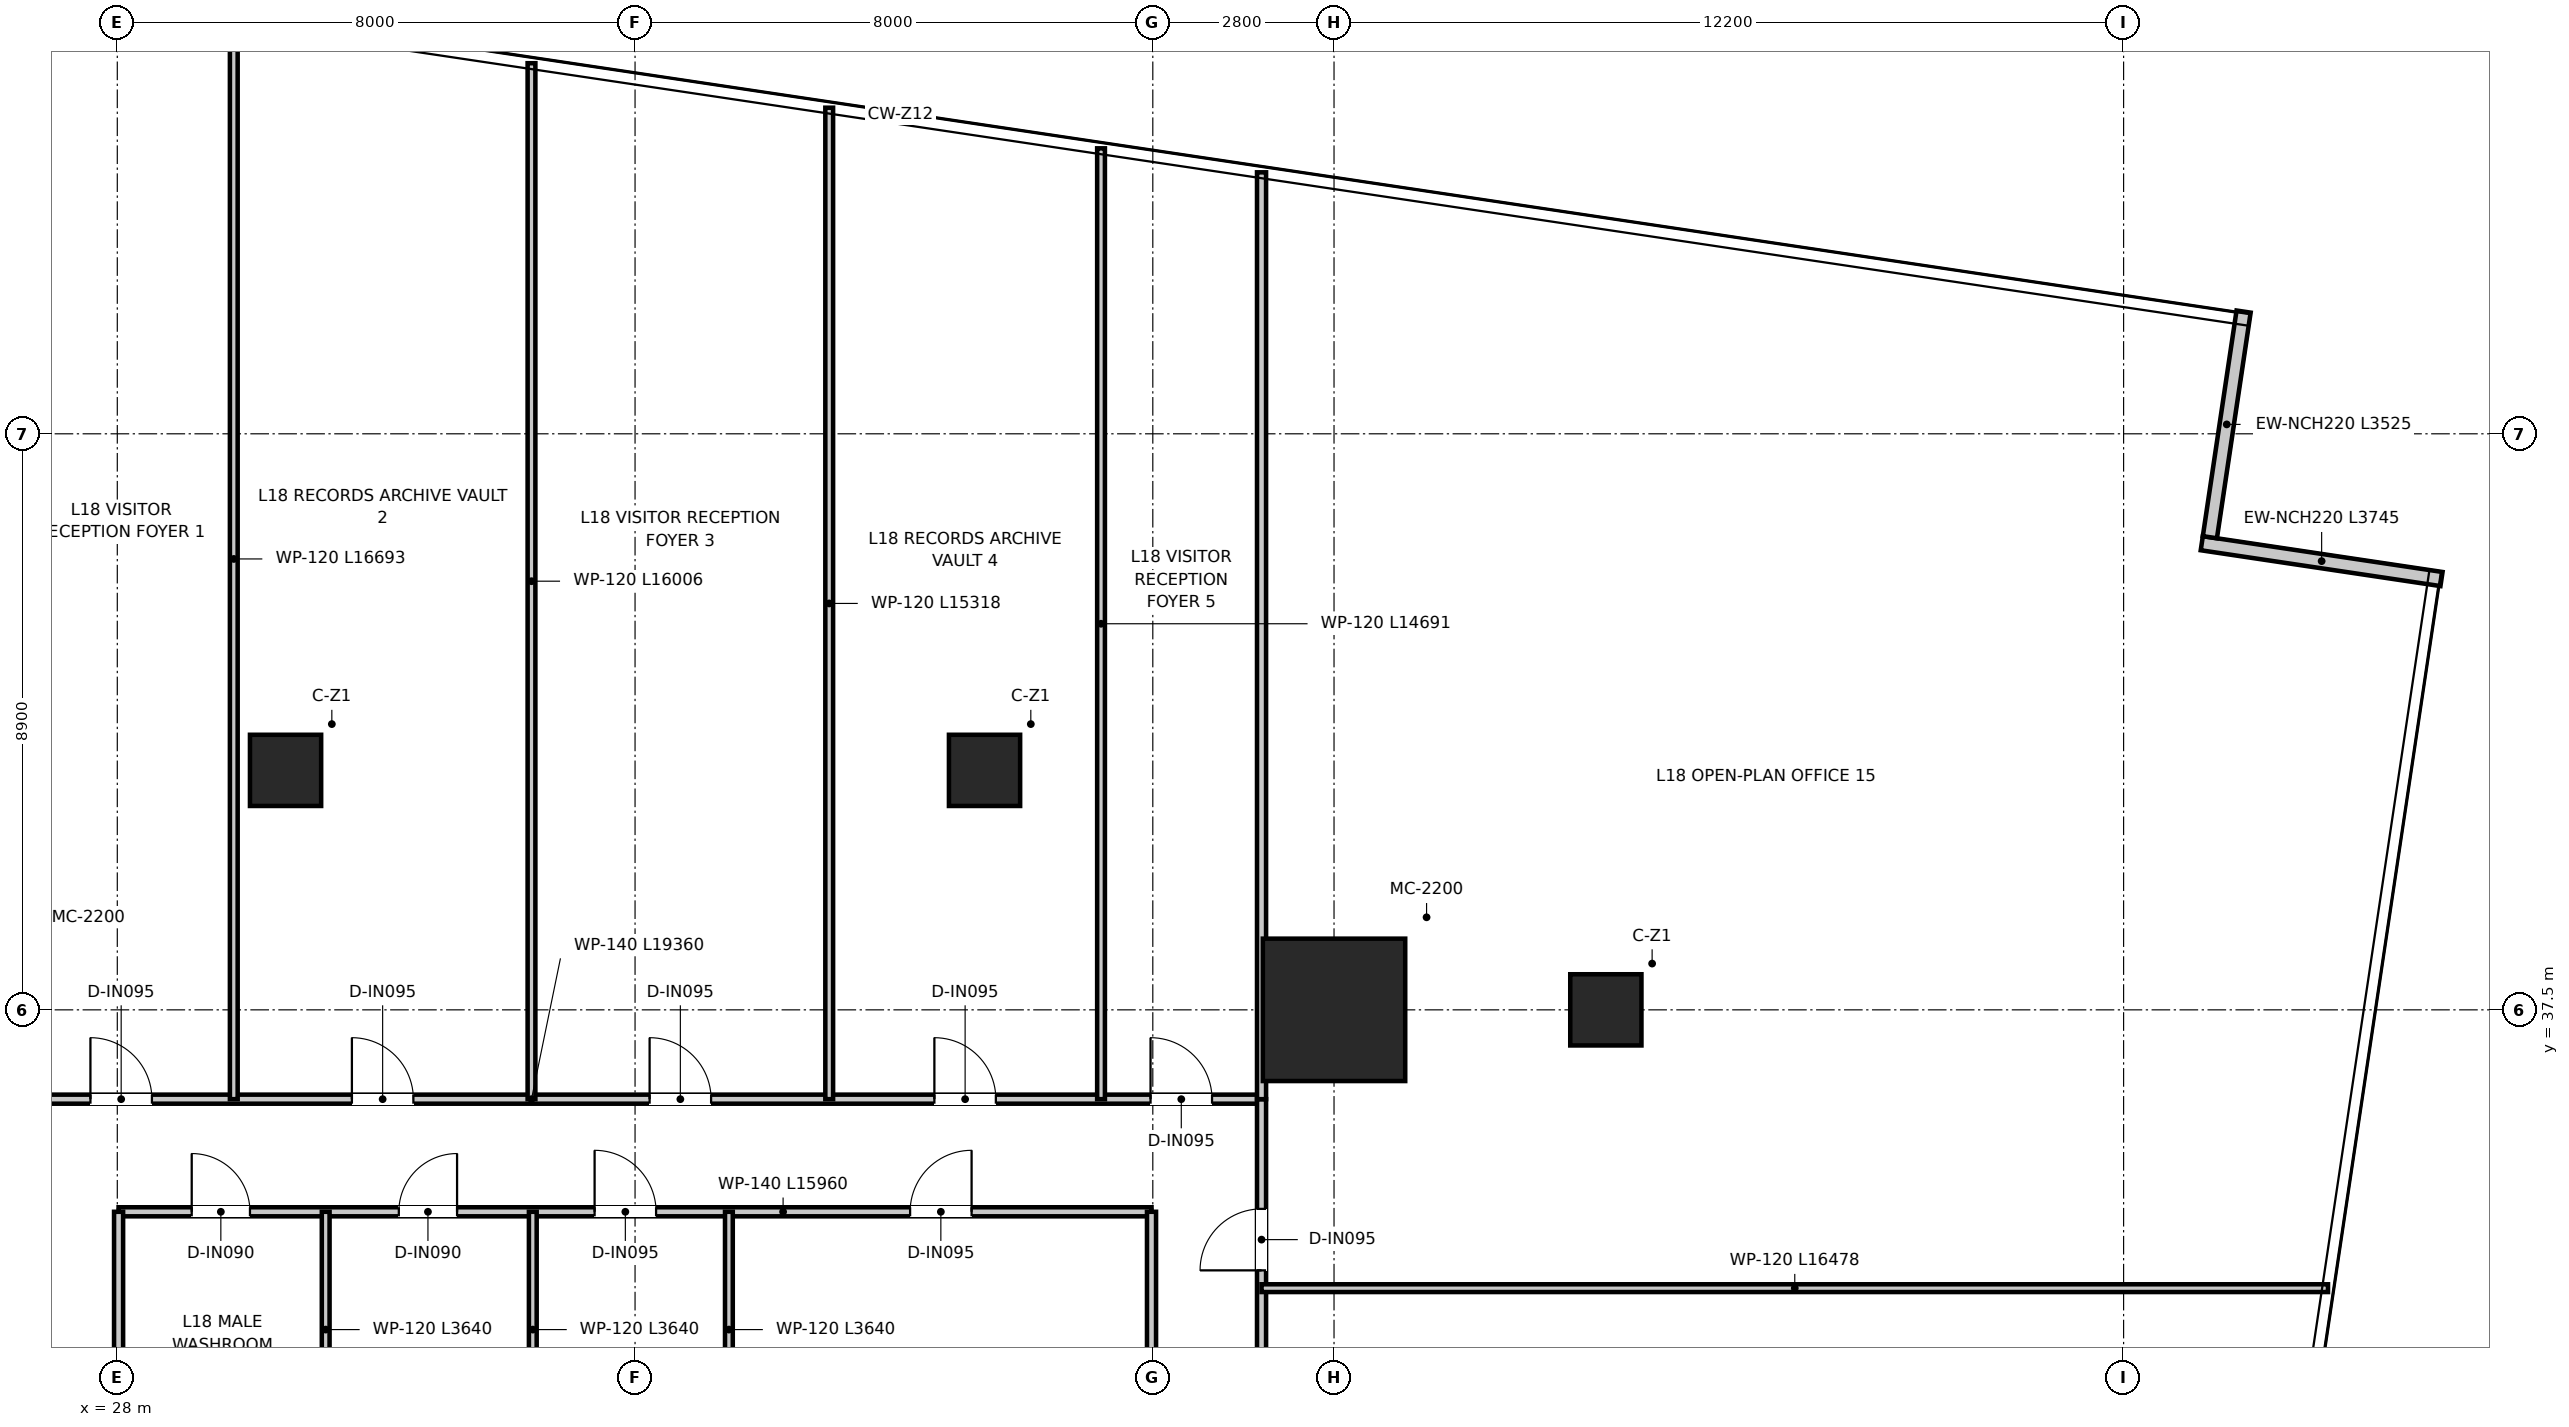
"""IFC4 building model, lengths in metres.
Left out: names, types, materials, properties, quantities, classifications, styles, units other than length and angle.
Written with IfcOpenShell. Run it as: python <this file> out.ifc"""

import sys

from ifc_helpers import new_model, si_unit, direction, frame, frame_2d, origin, origin_2d, place, context, subcontext, project, spatial, rectangle, extrude, source, transform, mapped, element, fill, save


model = new_model("IFC4")
c1 = context("Model", 3, precision=1e-05, world=origin(), true_north=direction((0.0, 1.0)))
c2 = subcontext(c1, "Body", "Model", "MODEL_VIEW")
j1 = project(units=[si_unit("LENGTHUNIT", "METRE"), si_unit("PLANEANGLEUNIT", "RADIAN")], contexts=[c1])
p1 = place(None, origin())
s1 = spatial("IfcSite", under=j1, at=p1, CompositionType="ELEMENT")
p2 = place(p1, origin())
s2 = spatial("IfcBuilding", under=s1, at=p2, CompositionType="ELEMENT")
p3 = place(p2, frame((0.0, 0.0, 76.35)))
s3 = spatial("IfcBuildingStorey", under=s2, at=p3, CompositionType="ELEMENT", Elevation=76.35)
m1 = source(origin(), c2, "Body", "SweptSolid", [
    extrude(rectangle(XDim=2.2, YDim=2.2, at=origin_2d()), origin(), (0.0, 0.0, 1.0), 3.95),
])
p4 = place(p3, frame((46.8, 37.5, 0.0), z_axis=(0.0, 0.0, 1.0), x_axis=(1.0, 0.0, 0.0)))
e1 = element("IfcColumn", 1, at=p4, inside=s3, PredefinedType="USERDEFINED", context=c2, shape_type="MappedRepresentation", body=[
    mapped(m1, transform((0.0, 0.0, 0.0), x_axis=(1.0, 0.0, 0.0), y_axis=(0.0, 1.0, 0.0), z_axis=(0.0, 0.0, 1.0), scale=1.0)),
])
m2 = source(origin(), c2, "Body", "SweptSolid", [
    extrude(rectangle(XDim=1.1, YDim=1.1, at=origin_2d()), origin(), (0.0, 0.0, 1.0), 3.95),
])
for number, where, z_axis, x_axis in (
    (2, (30.6, 41.2, 0.0), (0.0, 0.0, 1.0), (1.0, 0.0, 0.0)),
    (3, (41.4, 41.2, 0.0), (0.0, 0.0, 1.0), (1.0, 0.0, 0.0)),
    (4, (51.0, 37.5, 0.0), (0.0, 0.0, 1.0), (1.0, 0.0, 0.0)),
):
    element("IfcColumn", number, at=place(p3, frame(where, z_axis=z_axis, x_axis=x_axis)), inside=s3, PredefinedType="COLUMN", context=c2, shape_type="MappedRepresentation", body=[
        mapped(m2, transform((0.0, 0.0, 0.0), x_axis=(1.0, 0.0, 0.0), y_axis=(0.0, 1.0, 0.0), z_axis=(0.0, 0.0, 1.0), scale=1.0)),
    ])
p5 = place(p3, frame((63.912, 44.156, 0.0), z_axis=(0.0, 0.0, 1.0), x_axis=(-0.989009392913, 0.147852699435, 0.0)))
e5 = element("IfcWall", 5, at=p5, inside=s3, PredefinedType="ELEMENTEDWALL", context=c2, shape_type="SweptSolid", body=[
    extrude(rectangle(XDim=3.745, YDim=0.22, at=frame_2d((1.873, 0.0))), origin(), (0.0, 0.0, 1.0), 3.59),
])
p6 = place(p3, frame((60.333, 44.802, 0.0), z_axis=(0.0, 0.0, 1.0), x_axis=(0.147798551521, 0.98901748628, 0.0)))
e6 = element("IfcWall", 6, at=p6, inside=s3, PredefinedType="ELEMENTEDWALL", context=c2, shape_type="SweptSolid", body=[
    extrude(rectangle(XDim=3.525, YDim=0.22, at=frame_2d((1.763, 0.0))), origin(), (0.0, 0.0, 1.0), 3.59),
])
p7 = place(p3, frame((28.02, 34.38, 0.0), z_axis=(0.0, 0.0, 1.0), x_axis=(1.0, 0.0, 0.0)))
e7 = element("IfcWall", 7, at=p7, inside=s3, PredefinedType="PARTITIONING", context=c2, shape_type="SweptSolid", body=[
    extrude(rectangle(XDim=15.96, YDim=0.14, at=frame_2d((7.98, 0.0))), origin(), (0.0, 0.0, 1.0), 3.0),
])
p8 = place(p7, frame((1.13, 0.0, 0.0)))
e8 = element("IfcOpeningElement", 8, at=p8, cuts=e7, PredefinedType="OPENING", context=c2, shape_type="SweptSolid", body=[
    extrude(rectangle(XDim=0.9, YDim=2.1, at=frame_2d((0.45, 1.05))), frame((0.0, 0.08, 0.0), z_axis=(0.0, -1.0, 0.0), x_axis=(1.0, 0.0, 0.0)), (0.0, 0.0, 1.0), 0.16),
])
p9 = place(p7, frame((4.33, 0.0, 0.0)))
e9 = element("IfcOpeningElement", 9, at=p9, cuts=e7, PredefinedType="OPENING", context=c2, shape_type="SweptSolid", body=[
    extrude(rectangle(XDim=0.9, YDim=2.1, at=frame_2d((0.45, 1.05))), frame((0.0, 0.08, 0.0), z_axis=(0.0, -1.0, 0.0), x_axis=(1.0, 0.0, 0.0)), (0.0, 0.0, 1.0), 0.16),
])
p10 = place(p7, frame((7.355, 0.0, 0.0)))
e10 = element("IfcOpeningElement", 10, at=p10, cuts=e7, PredefinedType="OPENING", context=c2, shape_type="SweptSolid", body=[
    extrude(rectangle(XDim=0.95, YDim=2.1, at=frame_2d((0.475, 1.05))), frame((0.0, 0.08, 0.0), z_axis=(0.0, -1.0, 0.0), x_axis=(1.0, 0.0, 0.0)), (0.0, 0.0, 1.0), 0.16),
])
p11 = place(p7, frame((12.23, 0.0, 0.0)))
e11 = element("IfcOpeningElement", 11, at=p11, cuts=e7, PredefinedType="OPENING", context=c2, shape_type="SweptSolid", body=[
    extrude(rectangle(XDim=0.95, YDim=2.1, at=frame_2d((0.475, 1.05))), frame((0.0, 0.08, 0.0), z_axis=(0.0, -1.0, 0.0), x_axis=(1.0, 0.0, 0.0)), (0.0, 0.0, 1.0), 0.16),
])
for number, where, z_axis, x_axis in (
    (12, (28.02, 28.64, 0.0), (0.0, 0.0, 1.0), (0.0, 1.0, 0.0)),
    (13, (43.98, 28.64, 0.0), (0.0, 0.0, 1.0), (0.0, 1.0, 0.0)),
):
    element("IfcWall", number, at=place(p3, frame(where, z_axis=z_axis, x_axis=x_axis)), inside=s3, PredefinedType="PARTITIONING", context=c2, shape_type="SweptSolid", body=[
        extrude(rectangle(XDim=5.74, YDim=0.14, at=frame_2d((2.87, 0.0))), origin(), (0.0, 0.0, 1.0), 3.14),
    ])
for number, where, z_axis, x_axis in (
    (14, (31.22, 30.74, 0.0), (0.0, 0.0, 1.0), (0.0, 1.0, 0.0)),
    (15, (34.42, 30.74, 0.0), (0.0, 0.0, 1.0), (0.0, 1.0, 0.0)),
    (16, (37.45, 30.74, 0.0), (0.0, 0.0, 1.0), (0.0, 1.0, 0.0)),
):
    element("IfcWall", number, at=place(p3, frame(where, z_axis=z_axis, x_axis=x_axis)), inside=s3, PredefinedType="PARTITIONING", context=c2, shape_type="SweptSolid", body=[
        extrude(rectangle(XDim=3.64, YDim=0.12, at=frame_2d((1.82, 0.0))), origin(), (0.0, 0.0, 1.0), 3.04),
    ])
p12 = place(p3, frame((26.32, 36.12, 0.0), z_axis=(0.0, 0.0, 1.0), x_axis=(1.0, 0.0, 0.0)))
e17 = element("IfcWall", 17, at=p12, inside=s3, PredefinedType="PARTITIONING", context=c2, shape_type="SweptSolid", body=[
    extrude(rectangle(XDim=19.36, YDim=0.14, at=frame_2d((9.68, 0.0))), origin(), (0.0, 0.0, 1.0), 3.0),
])
p13 = place(p12, frame((1.265, 0.0, 0.0)))
e18 = element("IfcOpeningElement", 18, at=p13, cuts=e17, PredefinedType="OPENING", context=c2, shape_type="SweptSolid", body=[
    extrude(rectangle(XDim=0.95, YDim=2.1, at=frame_2d((0.475, 1.05))), frame((0.0, 0.08, 0.0), z_axis=(0.0, -1.0, 0.0), x_axis=(1.0, 0.0, 0.0)), (0.0, 0.0, 1.0), 0.16),
])
p14 = place(p12, frame((5.305, 0.0, 0.0)))
e19 = element("IfcOpeningElement", 19, at=p14, cuts=e17, PredefinedType="OPENING", context=c2, shape_type="SweptSolid", body=[
    extrude(rectangle(XDim=0.95, YDim=2.1, at=frame_2d((0.475, 1.05))), frame((0.0, 0.08, 0.0), z_axis=(0.0, -1.0, 0.0), x_axis=(1.0, 0.0, 0.0)), (0.0, 0.0, 1.0), 0.16),
])
p15 = place(p12, frame((9.905, 0.0, 0.0)))
e20 = element("IfcOpeningElement", 20, at=p15, cuts=e17, PredefinedType="OPENING", context=c2, shape_type="SweptSolid", body=[
    extrude(rectangle(XDim=0.95, YDim=2.1, at=frame_2d((0.475, 1.05))), frame((0.0, 0.08, 0.0), z_axis=(0.0, -1.0, 0.0), x_axis=(1.0, 0.0, 0.0)), (0.0, 0.0, 1.0), 0.16),
])
p16 = place(p12, frame((14.305, 0.0, 0.0)))
e21 = element("IfcOpeningElement", 21, at=p16, cuts=e17, PredefinedType="OPENING", context=c2, shape_type="SweptSolid", body=[
    extrude(rectangle(XDim=0.95, YDim=2.1, at=frame_2d((0.475, 1.05))), frame((0.0, 0.08, 0.0), z_axis=(0.0, -1.0, 0.0), x_axis=(1.0, 0.0, 0.0)), (0.0, 0.0, 1.0), 0.16),
])
p17 = place(p12, frame((17.645, 0.0, 0.0)))
e22 = element("IfcOpeningElement", 22, at=p17, cuts=e17, PredefinedType="OPENING", context=c2, shape_type="SweptSolid", body=[
    extrude(rectangle(XDim=0.95, YDim=2.1, at=frame_2d((0.475, 1.05))), frame((0.0, 0.08, 0.0), z_axis=(0.0, -1.0, 0.0), x_axis=(1.0, 0.0, 0.0)), (0.0, 0.0, 1.0), 0.16),
])
p18 = place(p3, frame((45.68, 10.5, 0.0), z_axis=(0.0, 0.0, 1.0), x_axis=(0.0, 1.0, 0.0)))
e23 = element("IfcWall", 23, at=p18, inside=s3, PredefinedType="PARTITIONING", context=c2, shape_type="SweptSolid", body=[
    extrude(rectangle(XDim=25.62, YDim=0.14, at=frame_2d((12.81, 0.0))), origin(), (0.0, 0.0, 1.0), 2.89),
])
p19 = place(p18, frame((7.775, 0.0, 0.0)))
e24 = element("IfcOpeningElement", 24, at=p19, cuts=e23, PredefinedType="OPENING", context=c2, shape_type="SweptSolid", body=[
    extrude(rectangle(XDim=0.95, YDim=2.1, at=frame_2d((0.475, 1.05))), frame((0.0, 0.08, 0.0), z_axis=(0.0, -1.0, 0.0), x_axis=(1.0, 0.0, 0.0)), (0.0, 0.0, 1.0), 0.16),
])
p20 = place(p18, frame((11.275, 0.0, 0.0)))
e25 = element("IfcOpeningElement", 25, at=p20, cuts=e23, PredefinedType="OPENING", context=c2, shape_type="SweptSolid", body=[
    extrude(rectangle(XDim=0.95, YDim=2.1, at=frame_2d((0.475, 1.05))), frame((0.0, 0.08, 0.0), z_axis=(0.0, -1.0, 0.0), x_axis=(1.0, 0.0, 0.0)), (0.0, 0.0, 1.0), 0.16),
])
p21 = place(p18, frame((15.775, 0.0, 0.0)))
e26 = element("IfcOpeningElement", 26, at=p21, cuts=e23, PredefinedType="OPENING", context=c2, shape_type="SweptSolid", body=[
    extrude(rectangle(XDim=0.95, YDim=2.1, at=frame_2d((0.475, 1.05))), frame((0.0, 0.08, 0.0), z_axis=(0.0, -1.0, 0.0), x_axis=(1.0, 0.0, 0.0)), (0.0, 0.0, 1.0), 0.16),
])
p22 = place(p18, frame((20.125, 0.0, 0.0)))
e27 = element("IfcOpeningElement", 27, at=p22, cuts=e23, PredefinedType="OPENING", context=c2, shape_type="SweptSolid", body=[
    extrude(rectangle(XDim=0.95, YDim=2.1, at=frame_2d((0.475, 1.05))), frame((0.0, 0.08, 0.0), z_axis=(0.0, -1.0, 0.0), x_axis=(1.0, 0.0, 0.0)), (0.0, 0.0, 1.0), 0.16),
])
p23 = place(p18, frame((22.975, 0.0, 0.0)))
e28 = element("IfcOpeningElement", 28, at=p23, cuts=e23, PredefinedType="OPENING", context=c2, shape_type="SweptSolid", body=[
    extrude(rectangle(XDim=0.95, YDim=2.1, at=frame_2d((0.475, 1.05))), frame((0.0, 0.08, 0.0), z_axis=(0.0, -1.0, 0.0), x_axis=(1.0, 0.0, 0.0)), (0.0, 0.0, 1.0), 0.16),
])
p24 = place(p3, frame((45.68, 36.12, 0.0), z_axis=(0.0, 0.0, 1.0), x_axis=(0.0, 1.0, 0.0)))
e29 = element("IfcWall", 29, at=p24, inside=s3, PredefinedType="PARTITIONING", context=c2, shape_type="SweptSolid", body=[
    extrude(rectangle(XDim=14.32, YDim=0.14, at=frame_2d((7.16, 0.0))), origin(), (0.0, 0.0, 1.0), 2.89),
])
p25 = place(p3, frame((29.8, 36.12, 0.0), z_axis=(0.0, 0.0, 1.0), x_axis=(0.0, 1.0, 0.0)))
e30 = element("IfcWall", 30, at=p25, inside=s3, PredefinedType="PARTITIONING", context=c2, shape_type="SweptSolid", body=[
    extrude(rectangle(XDim=16.693, YDim=0.12, at=frame_2d((8.347, 0.0))), origin(), (0.0, 0.0, 1.0), 2.89),
])
p26 = place(p3, frame((34.4, 36.12, 0.0), z_axis=(0.0, 0.0, 1.0), x_axis=(0.0, 1.0, 0.0)))
e31 = element("IfcWall", 31, at=p26, inside=s3, PredefinedType="PARTITIONING", context=c2, shape_type="SweptSolid", body=[
    extrude(rectangle(XDim=16.006, YDim=0.12, at=frame_2d((8.003, 0.0))), origin(), (0.0, 0.0, 1.0), 2.89),
])
p27 = place(p3, frame((39.0, 36.12, 0.0), z_axis=(0.0, 0.0, 1.0), x_axis=(0.0, 1.0, 0.0)))
e32 = element("IfcWall", 32, at=p27, inside=s3, PredefinedType="PARTITIONING", context=c2, shape_type="SweptSolid", body=[
    extrude(rectangle(XDim=15.318, YDim=0.12, at=frame_2d((7.659, 0.0))), origin(), (0.0, 0.0, 1.0), 2.89),
])
p28 = place(p3, frame((43.2, 36.12, 0.0), z_axis=(0.0, 0.0, 1.0), x_axis=(0.0, 1.0, 0.0)))
e33 = element("IfcWall", 33, at=p28, inside=s3, PredefinedType="PARTITIONING", context=c2, shape_type="SweptSolid", body=[
    extrude(rectangle(XDim=14.69, YDim=0.12, at=frame_2d((7.345, 0.0))), origin(), (0.0, 0.0, 1.0), 2.89),
])
p29 = place(p3, frame((45.68, 33.2, 0.0), z_axis=(0.0, 0.0, 1.0), x_axis=(1.0, 0.0, 0.0)))
e34 = element("IfcWall", 34, at=p29, inside=s3, PredefinedType="PARTITIONING", context=c2, shape_type="SweptSolid", body=[
    extrude(rectangle(XDim=16.478, YDim=0.12, at=frame_2d((8.239, 0.0))), origin(), (0.0, 0.0, 1.0), 2.89),
])
p30 = place(p8, origin())
e35 = element("IfcDoor", 35, at=p30, inside=s3, OperationType="SINGLE_SWING_LEFT", PredefinedType="DOOR", context=c2, shape_type="SweptSolid", body=[
    extrude(rectangle(XDim=0.9, YDim=2.1, at=frame_2d((0.45, 1.05))), frame((0.0, 0.025, 0.0), z_axis=(0.0, -1.0, 0.0), x_axis=(1.0, 0.0, 0.0)), (0.0, 0.0, 1.0), 0.05),
])
fill(e8, e35)
p31 = place(p9, origin())
e36 = element("IfcDoor", 36, at=p31, inside=s3, OperationType="SINGLE_SWING_RIGHT", PredefinedType="DOOR", context=c2, shape_type="SweptSolid", body=[
    extrude(rectangle(XDim=0.9, YDim=2.1, at=frame_2d((0.45, 1.05))), frame((0.0, 0.025, 0.0), z_axis=(0.0, -1.0, 0.0), x_axis=(1.0, 0.0, 0.0)), (0.0, 0.0, 1.0), 0.05),
])
fill(e9, e36)
p32 = place(p10, origin())
e37 = element("IfcDoor", 37, at=p32, inside=s3, OperationType="SINGLE_SWING_LEFT", PredefinedType="DOOR", context=c2, shape_type="SweptSolid", body=[
    extrude(rectangle(XDim=0.95, YDim=2.1, at=frame_2d((0.475, 1.05))), frame((0.0, 0.025, 0.0), z_axis=(0.0, -1.0, 0.0), x_axis=(1.0, 0.0, 0.0)), (0.0, 0.0, 1.0), 0.05),
])
fill(e10, e37)
p33 = place(p11, origin())
e38 = element("IfcDoor", 38, at=p33, inside=s3, OperationType="SINGLE_SWING_RIGHT", PredefinedType="DOOR", context=c2, shape_type="SweptSolid", body=[
    extrude(rectangle(XDim=0.95, YDim=2.1, at=frame_2d((0.475, 1.05))), frame((0.0, 0.025, 0.0), z_axis=(0.0, -1.0, 0.0), x_axis=(1.0, 0.0, 0.0)), (0.0, 0.0, 1.0), 0.05),
])
fill(e11, e38)
p34 = place(p13, origin())
e39 = element("IfcDoor", 39, at=p34, inside=s3, OperationType="SINGLE_SWING_LEFT", PredefinedType="DOOR", context=c2, shape_type="SweptSolid", body=[
    extrude(rectangle(XDim=0.95, YDim=2.1, at=frame_2d((0.475, 1.05))), frame((0.0, 0.025, 0.0), z_axis=(0.0, -1.0, 0.0), x_axis=(1.0, 0.0, 0.0)), (0.0, 0.0, 1.0), 0.05),
])
fill(e18, e39)
p35 = place(p14, origin())
e40 = element("IfcDoor", 40, at=p35, inside=s3, OperationType="SINGLE_SWING_LEFT", PredefinedType="DOOR", context=c2, shape_type="SweptSolid", body=[
    extrude(rectangle(XDim=0.95, YDim=2.1, at=frame_2d((0.475, 1.05))), frame((0.0, 0.025, 0.0), z_axis=(0.0, -1.0, 0.0), x_axis=(1.0, 0.0, 0.0)), (0.0, 0.0, 1.0), 0.05),
])
fill(e19, e40)
p36 = place(p15, origin())
e41 = element("IfcDoor", 41, at=p36, inside=s3, OperationType="SINGLE_SWING_LEFT", PredefinedType="DOOR", context=c2, shape_type="SweptSolid", body=[
    extrude(rectangle(XDim=0.95, YDim=2.1, at=frame_2d((0.475, 1.05))), frame((0.0, 0.025, 0.0), z_axis=(0.0, -1.0, 0.0), x_axis=(1.0, 0.0, 0.0)), (0.0, 0.0, 1.0), 0.05),
])
fill(e20, e41)
p37 = place(p16, origin())
e42 = element("IfcDoor", 42, at=p37, inside=s3, OperationType="SINGLE_SWING_LEFT", PredefinedType="DOOR", context=c2, shape_type="SweptSolid", body=[
    extrude(rectangle(XDim=0.95, YDim=2.1, at=frame_2d((0.475, 1.05))), frame((0.0, 0.025, 0.0), z_axis=(0.0, -1.0, 0.0), x_axis=(1.0, 0.0, 0.0)), (0.0, 0.0, 1.0), 0.05),
])
fill(e21, e42)
p38 = place(p17, origin())
e43 = element("IfcDoor", 43, at=p38, inside=s3, OperationType="SINGLE_SWING_LEFT", PredefinedType="DOOR", context=c2, shape_type="SweptSolid", body=[
    extrude(rectangle(XDim=0.95, YDim=2.1, at=frame_2d((0.475, 1.05))), frame((0.0, 0.025, 0.0), z_axis=(0.0, -1.0, 0.0), x_axis=(1.0, 0.0, 0.0)), (0.0, 0.0, 1.0), 0.05),
])
fill(e22, e43)
p39 = place(p23, origin())
e44 = element("IfcDoor", 44, at=p39, inside=s3, OperationType="SINGLE_SWING_LEFT", PredefinedType="DOOR", context=c2, shape_type="SweptSolid", body=[
    extrude(rectangle(XDim=0.95, YDim=2.1, at=frame_2d((0.475, 1.05))), frame((0.0, 0.025, 0.0), z_axis=(0.0, -1.0, 0.0), x_axis=(1.0, 0.0, 0.0)), (0.0, 0.0, 1.0), 0.05),
])
fill(e28, e44)
save(model, sys.argv[1])
